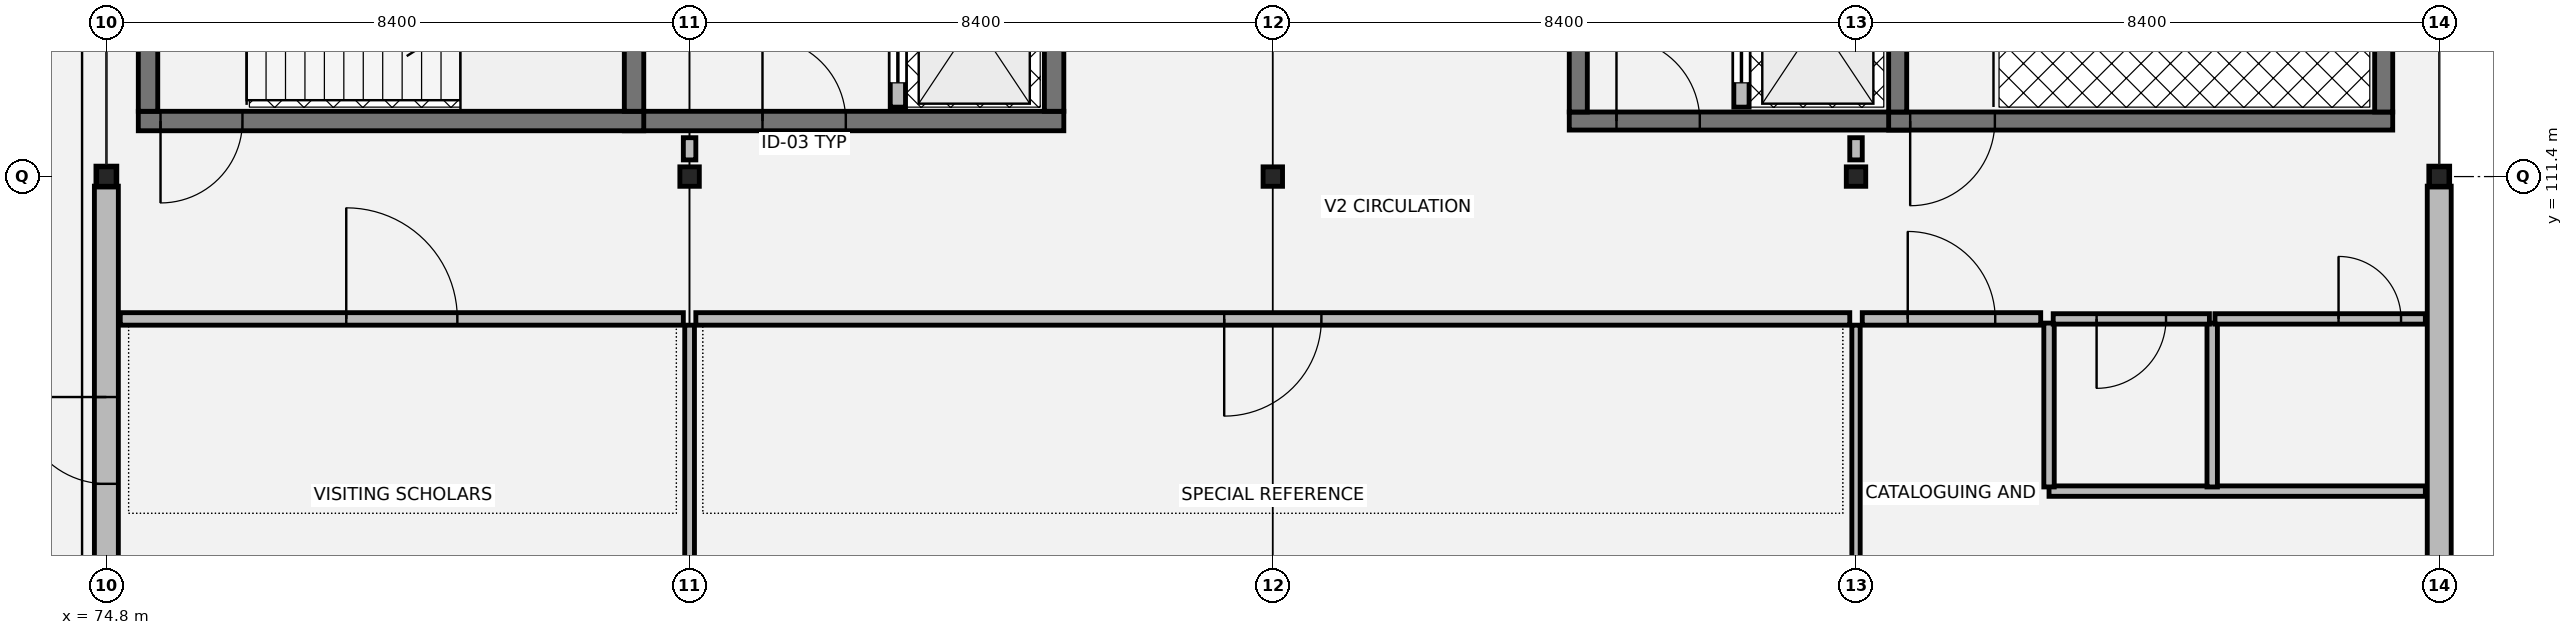
"""IFC4 building model, lengths in metres.
Left out: names, types, materials, properties, quantities, classifications, styles, units other than length and angle.
Written with IfcOpenShell. Run it as: python <this file> out.ifc"""

import sys

from ifc_helpers import new_model, si_unit, direction, frame, frame_2d, origin, origin_2d, place, context, subcontext, project, spatial, rectangle, i_section, extrude, element, fill, save


model = new_model("IFC4")
c1 = context("Model", 3, precision=1e-05, world=origin(), true_north=direction((0.0, 1.0)))
c2 = subcontext(c1, "Body", "Model", "MODEL_VIEW")
j1 = project(units=[si_unit("LENGTHUNIT", "METRE"), si_unit("PLANEANGLEUNIT", "RADIAN")], contexts=[c1])
p1 = place(None, origin())
s1 = spatial("IfcSite", under=j1, at=p1, CompositionType="ELEMENT")
p2 = place(p1, origin())
s2 = spatial("IfcBuilding", under=s1, at=p2, CompositionType="ELEMENT")
p3 = place(p2, frame((0.0, 0.0, 21.42)))
s3 = spatial("IfcBuildingStorey", under=s2, at=p3, CompositionType="ELEMENT", Elevation=21.42)
for number, where, z_axis, x_axis in (
    (1, (74.8, 111.4, 0.0), (0.0, 0.0, 1.0), (1.0, 0.0, 0.0)),
    (2, (83.2, 111.4, 0.0), (0.0, 0.0, 1.0), (1.0, 0.0, 0.0)),
    (3, (91.6, 111.4, 0.0), (0.0, 0.0, 1.0), (1.0, 0.0, 0.0)),
    (4, (100.0, 111.4, 0.0), (0.0, 0.0, 1.0), (1.0, 0.0, 0.0)),
    (5, (108.4, 111.4, 0.0), (0.0, 0.0, 1.0), (1.0, 0.0, 0.0)),
):
    element("IfcColumn", number, at=place(p3, frame(where, z_axis=z_axis, x_axis=x_axis)), inside=s3, PredefinedType="COLUMN", context=c2, shape_type="SweptSolid", body=[
        extrude(i_section(OverallWidth=0.28, OverallDepth=0.28, WebThickness=0.01, FlangeThickness=0.018, at=origin_2d()), origin(), (0.0, 0.0, 1.0), 3.88),
    ])
p4 = place(p3, frame((108.4, 103.938, 0.0), z_axis=(0.0, 0.0, 1.0), x_axis=(0.0, 1.0, 0.0)))
e6 = element("IfcWall", 6, at=p4, inside=s3, PredefinedType="SOLIDWALL", context=c2, shape_type="SweptSolid", body=[
    extrude(rectangle(XDim=7.324, YDim=0.345, at=frame_2d((3.662, 0.0))), origin(), (0.0, 0.0, 1.0), 3.22),
])
p5 = place(p3, frame((74.8, 111.262, 0.0), z_axis=(0.0, 0.0, 1.0), x_axis=(0.0, -1.0, 0.0)))
e7 = element("IfcWall", 7, at=p5, inside=s3, PredefinedType="SOLIDWALL", context=c2, shape_type="SweptSolid", body=[
    extrude(rectangle(XDim=7.324, YDim=0.345, at=frame_2d((3.662, 0.0))), origin(), (0.0, 0.0, 1.0), 3.22),
])
p6 = place(p5, frame((3.037, 0.0, 0.0)))
e8 = element("IfcOpeningElement", 8, at=p6, cuts=e7, PredefinedType="OPENING", context=c2, shape_type="SweptSolid", body=[
    extrude(rectangle(XDim=1.25, YDim=2.2, at=frame_2d((0.625, 1.1))), frame((0.0, 0.182, 0.0), z_axis=(0.0, -1.0, 0.0), x_axis=(1.0, 0.0, 0.0)), (0.0, 0.0, 1.0), 0.365),
])
p7 = place(p3, frame((82.26, 112.2, 0.0), z_axis=(0.0, 0.0, 1.0), x_axis=(1.0, 0.0, 0.0)))
e9 = element("IfcWall", 9, at=p7, inside=s3, PredefinedType="SHEAR", context=c2, shape_type="SweptSolid", body=[
    extrude(rectangle(XDim=6.33, YDim=0.28, at=frame_2d((3.165, 0.0))), origin(), (0.0, 0.0, 1.0), 3.845),
])
p8 = place(p7, frame((1.99, 0.0, 0.0)))
e10 = element("IfcOpeningElement", 10, at=p8, cuts=e9, PredefinedType="OPENING", context=c2, shape_type="SweptSolid", body=[
    extrude(rectangle(XDim=1.2, YDim=2.16, at=frame_2d((0.6, 1.08))), frame((0.0, 0.15, 0.0), z_axis=(0.0, -1.0, 0.0), x_axis=(1.0, 0.0, 0.0)), (0.0, 0.0, 1.0), 0.3),
])
p9 = place(p3, frame((88.45, 112.34, 0.0), z_axis=(0.0, 0.0, 1.0), x_axis=(0.0, 1.0, 0.0)))
e11 = element("IfcWall", 11, at=p9, inside=s3, PredefinedType="SHEAR", context=c2, shape_type="SweptSolid", body=[
    extrude(rectangle(XDim=5.72, YDim=0.28, at=frame_2d((2.86, 0.0))), origin(), (0.0, 0.0, 1.0), 3.845),
])
p10 = place(p3, frame((86.2, 112.4, 0.0), z_axis=(0.0, 0.0, 1.0), x_axis=(0.0, 1.0, 0.0)))
e12 = element("IfcWall", 12, at=p10, inside=s3, PredefinedType="SOLIDWALL", context=c2, shape_type="SweptSolid", body=[
    extrude(rectangle(XDim=5.6, YDim=0.22, at=frame_2d((2.8, 0.0))), origin(), (0.0, 0.0, 1.0), 3.845),
])
p11 = place(p10, frame((0.35, 0.0, 0.0)))
e13 = element("IfcOpeningElement", 13, at=p11, cuts=e12, PredefinedType="OPENING", context=c2, shape_type="SweptSolid", body=[
    extrude(rectangle(XDim=1.1, YDim=2.15, at=frame_2d((0.55, 1.075))), frame((0.0, 0.12, 0.0), z_axis=(0.0, -1.0, 0.0), x_axis=(1.0, 0.0, 0.0)), (0.0, 0.0, 1.0), 0.24),
])
p12 = place(p10, frame((2.4, 0.0, 0.0)))
e14 = element("IfcOpeningElement", 14, at=p12, cuts=e12, PredefinedType="OPENING", context=c2, shape_type="SweptSolid", body=[
    extrude(rectangle(XDim=1.1, YDim=2.15, at=frame_2d((0.55, 1.075))), frame((0.0, 0.12, 0.0), z_axis=(0.0, -1.0, 0.0), x_axis=(1.0, 0.0, 0.0)), (0.0, 0.0, 1.0), 0.24),
])
p13 = place(p3, frame((75.26, 112.2, 0.0), z_axis=(0.0, 0.0, 1.0), x_axis=(1.0, 0.0, 0.0)))
e15 = element("IfcWall", 15, at=p13, inside=s3, PredefinedType="SHEAR", context=c2, shape_type="SweptSolid", body=[
    extrude(rectangle(XDim=7.28, YDim=0.28, at=frame_2d((3.64, 0.0))), origin(), (0.0, 0.0, 1.0), 3.845),
])
p14 = place(p13, frame((0.32, 0.0, 0.0)))
e16 = element("IfcOpeningElement", 16, at=p14, cuts=e15, PredefinedType="OPENING", context=c2, shape_type="SweptSolid", body=[
    extrude(rectangle(XDim=1.18, YDim=2.18, at=frame_2d((0.59, 1.09))), frame((0.0, 0.15, 0.0), z_axis=(0.0, -1.0, 0.0), x_axis=(1.0, 0.0, 0.0)), (0.0, 0.0, 1.0), 0.3),
])
for number, where, z_axis, x_axis in (
    (17, (75.4, 112.34, 0.0), (0.0, 0.0, 1.0), (0.0, 1.0, 0.0)),
    (18, (82.4, 112.34, 0.0), (0.0, 0.0, 1.0), (0.0, 1.0, 0.0)),
):
    element("IfcWall", number, at=place(p3, frame(where, z_axis=z_axis, x_axis=x_axis)), inside=s3, PredefinedType="SHEAR", context=c2, shape_type="SweptSolid", body=[
        extrude(rectangle(XDim=5.72, YDim=0.28, at=frame_2d((2.86, 0.0))), origin(), (0.0, 0.0, 1.0), 3.845),
    ])
p15 = place(p3, frame((95.87, 112.2, 0.0), z_axis=(0.0, 0.0, 1.0), x_axis=(1.0, 0.0, 0.0)))
e19 = element("IfcWall", 19, at=p15, inside=s3, PredefinedType="SHEAR", context=c2, shape_type="SweptSolid", body=[
    extrude(rectangle(XDim=4.86, YDim=0.26, at=frame_2d((2.43, 0.0))), origin(), (0.0, 0.0, 1.0), 3.845),
])
p16 = place(p15, frame((0.68, 0.0, 0.0)))
e20 = element("IfcOpeningElement", 20, at=p16, cuts=e19, PredefinedType="OPENING", context=c2, shape_type="SweptSolid", body=[
    extrude(rectangle(XDim=1.2, YDim=2.16, at=frame_2d((0.6, 1.08))), frame((0.0, 0.14, 0.0), z_axis=(0.0, -1.0, 0.0), x_axis=(1.0, 0.0, 0.0)), (0.0, 0.0, 1.0), 0.28),
])
p17 = place(p3, frame((96.0, 118.07, 0.0), z_axis=(0.0, 0.0, 1.0), x_axis=(0.0, -1.0, 0.0)))
e21 = element("IfcWall", 21, at=p17, inside=s3, PredefinedType="SHEAR", context=c2, shape_type="SweptSolid", body=[
    extrude(rectangle(XDim=5.74, YDim=0.26, at=frame_2d((2.87, 0.0))), origin(), (0.0, 0.0, 1.0), 3.845),
])
p18 = place(p3, frame((98.35, 112.4, 0.0), z_axis=(0.0, 0.0, 1.0), x_axis=(0.0, 1.0, 0.0)))
e22 = element("IfcWall", 22, at=p18, inside=s3, PredefinedType="SOLIDWALL", context=c2, shape_type="SweptSolid", body=[
    extrude(rectangle(XDim=5.6, YDim=0.22, at=frame_2d((2.8, 0.0))), origin(), (0.0, 0.0, 1.0), 3.845),
])
p19 = place(p18, frame((0.35, 0.0, 0.0)))
e23 = element("IfcOpeningElement", 23, at=p19, cuts=e22, PredefinedType="OPENING", context=c2, shape_type="SweptSolid", body=[
    extrude(rectangle(XDim=1.1, YDim=2.15, at=frame_2d((0.55, 1.075))), frame((0.0, 0.12, 0.0), z_axis=(0.0, -1.0, 0.0), x_axis=(1.0, 0.0, 0.0)), (0.0, 0.0, 1.0), 0.24),
])
p20 = place(p3, frame((100.47, 112.2, 0.0), z_axis=(0.0, 0.0, 1.0), x_axis=(1.0, 0.0, 0.0)))
e24 = element("IfcWall", 24, at=p20, inside=s3, PredefinedType="SHEAR", context=c2, shape_type="SweptSolid", body=[
    extrude(rectangle(XDim=7.26, YDim=0.26, at=frame_2d((3.63, 0.0))), origin(), (0.0, 0.0, 1.0), 3.845),
])
p21 = place(p20, frame((0.31, 0.0, 0.0)))
e25 = element("IfcOpeningElement", 25, at=p21, cuts=e24, PredefinedType="OPENING", context=c2, shape_type="SweptSolid", body=[
    extrude(rectangle(XDim=1.22, YDim=2.18, at=frame_2d((0.61, 1.09))), frame((0.0, 0.14, 0.0), z_axis=(0.0, -1.0, 0.0), x_axis=(1.0, 0.0, 0.0)), (0.0, 0.0, 1.0), 0.28),
])
for number, where, z_axis, x_axis in (
    (26, (100.6, 112.33, 0.0), (0.0, 0.0, 1.0), (0.0, 1.0, 0.0)),
    (27, (107.6, 112.33, 0.0), (0.0, 0.0, 1.0), (0.0, 1.0, 0.0)),
):
    element("IfcWall", number, at=place(p3, frame(where, z_axis=z_axis, x_axis=x_axis)), inside=s3, PredefinedType="SHEAR", context=c2, shape_type="SweptSolid", body=[
        extrude(rectangle(XDim=5.74, YDim=0.26, at=frame_2d((2.87, 0.0))), origin(), (0.0, 0.0, 1.0), 3.845),
    ])
p22 = place(p3, frame((102.78, 106.87, 0.0), z_axis=(0.0, 0.0, 1.0), x_axis=(1.0, 0.0, 0.0)))
e28 = element("IfcWall", 28, at=p22, inside=s3, PredefinedType="PARTITIONING", context=c2, shape_type="SweptSolid", body=[
    extrude(rectangle(XDim=5.42, YDim=0.15, at=frame_2d((2.71, 0.0))), origin(), (0.0, 0.0, 1.0), 3.18),
])
for number, where, z_axis, x_axis in (
    (29, (102.78, 106.93, 0.0), (0.0, 0.0, 1.0), (0.0, 1.0, 0.0)),
    (30, (105.13, 106.93, 0.0), (0.0, 0.0, 1.0), (0.0, 1.0, 0.0)),
):
    element("IfcWall", number, at=place(p3, frame(where, z_axis=z_axis, x_axis=x_axis)), inside=s3, PredefinedType="PARTITIONING", context=c2, shape_type="SweptSolid", body=[
        extrude(rectangle(XDim=2.36, YDim=0.15, at=frame_2d((1.18, 0.0))), origin(), (0.0, 0.0, 1.0), 3.18),
    ])
p23 = place(p3, frame((102.84, 109.35, 0.0), z_axis=(0.0, 0.0, 1.0), x_axis=(1.0, 0.0, 0.0)))
e31 = element("IfcWall", 31, at=p23, inside=s3, PredefinedType="PARTITIONING", context=c2, shape_type="SweptSolid", body=[
    extrude(rectangle(XDim=2.25, YDim=0.15, at=frame_2d((1.125, 0.0))), origin(), (0.0, 0.0, 1.0), 3.18),
])
p24 = place(p23, frame((0.625, 0.0, 0.0)))
e32 = element("IfcOpeningElement", 32, at=p24, cuts=e31, PredefinedType="OPENING", context=c2, shape_type="SweptSolid", body=[
    extrude(rectangle(XDim=1.0, YDim=2.15, at=frame_2d((0.5, 1.075))), frame((0.0, 0.085, 0.0), z_axis=(0.0, -1.0, 0.0), x_axis=(1.0, 0.0, 0.0)), (0.0, 0.0, 1.0), 0.17),
])
p25 = place(p3, frame((105.17, 109.35, 0.0), z_axis=(0.0, 0.0, 1.0), x_axis=(1.0, 0.0, 0.0)))
e33 = element("IfcWall", 33, at=p25, inside=s3, PredefinedType="PARTITIONING", context=c2, shape_type="SweptSolid", body=[
    extrude(rectangle(XDim=3.03, YDim=0.15, at=frame_2d((1.515, 0.0))), origin(), (0.0, 0.0, 1.0), 3.18),
])
p26 = place(p25, frame((1.78, 0.0, 0.0)))
e34 = element("IfcOpeningElement", 34, at=p26, cuts=e33, PredefinedType="OPENING", context=c2, shape_type="SweptSolid", body=[
    extrude(rectangle(XDim=0.9, YDim=2.15, at=frame_2d((0.45, 1.075))), frame((0.0, 0.085, 0.0), z_axis=(0.0, -1.0, 0.0), x_axis=(1.0, 0.0, 0.0)), (0.0, 0.0, 1.0), 0.17),
])
p27 = place(p3, frame((75.0, 109.35, 0.0), z_axis=(0.0, 0.0, 1.0), x_axis=(1.0, 0.0, 0.0)))
e35 = element("IfcWall", 35, at=p27, inside=s3, PredefinedType="PARTITIONING", context=c2, shape_type="SweptSolid", body=[
    extrude(rectangle(XDim=8.11, YDim=0.18, at=frame_2d((4.055, 0.0))), origin(), (0.0, 0.0, 1.0), 3.18),
])
p28 = place(p27, frame((3.255, 0.0, 0.0)))
e36 = element("IfcOpeningElement", 36, at=p28, cuts=e35, PredefinedType="OPENING", context=c2, shape_type="SweptSolid", body=[
    extrude(rectangle(XDim=1.6, YDim=2.25, at=frame_2d((0.8, 1.125))), frame((0.0, 0.1, 0.0), z_axis=(0.0, -1.0, 0.0), x_axis=(1.0, 0.0, 0.0)), (0.0, 0.0, 1.0), 0.2),
])
p29 = place(p3, frame((83.29, 109.35, 0.0), z_axis=(0.0, 0.0, 1.0), x_axis=(1.0, 0.0, 0.0)))
e37 = element("IfcWall", 37, at=p29, inside=s3, PredefinedType="PARTITIONING", context=c2, shape_type="SweptSolid", body=[
    extrude(rectangle(XDim=16.62, YDim=0.18, at=frame_2d((8.31, 0.0))), origin(), (0.0, 0.0, 1.0), 3.18),
])
p30 = place(p29, frame((7.61, 0.0, 0.0)))
e38 = element("IfcOpeningElement", 38, at=p30, cuts=e37, PredefinedType="OPENING", context=c2, shape_type="SweptSolid", body=[
    extrude(rectangle(XDim=1.4, YDim=2.22, at=frame_2d((0.7, 1.11))), frame((0.0, 0.1, 0.0), z_axis=(0.0, -1.0, 0.0), x_axis=(1.0, 0.0, 0.0)), (0.0, 0.0, 1.0), 0.2),
])
p31 = place(p3, frame((100.09, 109.35, 0.0), z_axis=(0.0, 0.0, 1.0), x_axis=(1.0, 0.0, 0.0)))
e39 = element("IfcWall", 39, at=p31, inside=s3, PredefinedType="PARTITIONING", context=c2, shape_type="SweptSolid", body=[
    extrude(rectangle(XDim=2.57, YDim=0.18, at=frame_2d((1.285, 0.0))), origin(), (0.0, 0.0, 1.0), 3.18),
])
p32 = place(p31, frame((0.655, 0.0, 0.0)))
e40 = element("IfcOpeningElement", 40, at=p32, cuts=e39, PredefinedType="OPENING", context=c2, shape_type="SweptSolid", body=[
    extrude(rectangle(XDim=1.26, YDim=2.2, at=frame_2d((0.63, 1.1))), frame((0.0, 0.1, 0.0), z_axis=(0.0, -1.0, 0.0), x_axis=(1.0, 0.0, 0.0)), (0.0, 0.0, 1.0), 0.2),
])
for number, where, z_axis, x_axis in (
    (41, (83.2, 111.64, 0.0), (0.0, 0.0, 1.0), (0.0, 1.0, 0.0)),
    (42, (100.0, 111.64, 0.0), (0.0, 0.0, 1.0), (0.0, 1.0, 0.0)),
):
    element("IfcWall", number, at=place(p3, frame(where, z_axis=z_axis, x_axis=x_axis)), inside=s3, PredefinedType="PARTITIONING", context=c2, shape_type="SweptSolid", body=[
        extrude(rectangle(XDim=0.32, YDim=0.18, at=frame_2d((0.16, 0.0))), origin(), (0.0, 0.0, 1.0), 3.18),
    ])
p33 = place(p3, frame((83.2, 104.12, 0.0), z_axis=(0.0, 0.0, 1.0), x_axis=(0.0, 1.0, 0.0)))
e43 = element("IfcWall", 43, at=p33, inside=s3, PredefinedType="PARTITIONING", context=c2, shape_type="SweptSolid", body=[
    extrude(rectangle(XDim=5.14, YDim=0.14, at=frame_2d((2.57, 0.0))), origin(), (0.0, 0.0, 1.0), 3.18),
])
p34 = place(p3, frame((100.0, 104.12, 0.0), z_axis=(0.0, 0.0, 1.0), x_axis=(0.0, 1.0, 0.0)))
e44 = element("IfcWall", 44, at=p34, inside=s3, PredefinedType="PARTITIONING", context=c2, shape_type="SweptSolid", body=[
    extrude(rectangle(XDim=5.14, YDim=0.12, at=frame_2d((2.57, 0.0))), origin(), (0.0, 0.0, 1.0), 3.18),
])
p35 = place(p6, origin())
e45 = element("IfcDoor", 45, at=p35, inside=s3, OperationType="SINGLE_SWING_RIGHT", PredefinedType="DOOR", context=c2, shape_type="SweptSolid", body=[
    extrude(rectangle(XDim=1.25, YDim=2.2, at=frame_2d((0.625, 1.1))), frame((0.0, 0.025, 0.0), z_axis=(0.0, -1.0, 0.0), x_axis=(1.0, 0.0, 0.0)), (0.0, 0.0, 1.0), 0.05),
])
fill(e8, e45)
p36 = place(p8, origin())
e46 = element("IfcDoor", 46, at=p36, inside=s3, OperationType="SINGLE_SWING_LEFT", PredefinedType="DOOR", context=c2, shape_type="SweptSolid", body=[
    extrude(rectangle(XDim=1.2, YDim=2.16, at=frame_2d((0.6, 1.08))), frame((0.0, 0.025, 0.0), z_axis=(0.0, -1.0, 0.0), x_axis=(1.0, 0.0, 0.0)), (0.0, 0.0, 1.0), 0.05),
])
fill(e10, e46)
p37 = place(p11, origin())
e47 = element("IfcDoor", 47, at=p37, inside=s3, OperationType="SLIDING_TO_LEFT", PredefinedType="DOOR", context=c2, shape_type="SweptSolid", body=[
    extrude(rectangle(XDim=1.1, YDim=2.15, at=frame_2d((0.55, 1.075))), frame((0.0, 0.025, 0.0), z_axis=(0.0, -1.0, 0.0), x_axis=(1.0, 0.0, 0.0)), (0.0, 0.0, 1.0), 0.05),
])
fill(e13, e47)
p38 = place(p14, origin())
e48 = element("IfcDoor", 48, at=p38, inside=s3, OperationType="SINGLE_SWING_RIGHT", PredefinedType="DOOR", context=c2, shape_type="SweptSolid", body=[
    extrude(rectangle(XDim=1.18, YDim=2.18, at=frame_2d((0.59, 1.09))), frame((0.0, 0.025, 0.0), z_axis=(0.0, -1.0, 0.0), x_axis=(1.0, 0.0, 0.0)), (0.0, 0.0, 1.0), 0.05),
])
fill(e16, e48)
p39 = place(p16, origin())
e49 = element("IfcDoor", 49, at=p39, inside=s3, OperationType="SINGLE_SWING_LEFT", PredefinedType="DOOR", context=c2, shape_type="SweptSolid", body=[
    extrude(rectangle(XDim=1.2, YDim=2.16, at=frame_2d((0.6, 1.08))), frame((0.0, 0.025, 0.0), z_axis=(0.0, -1.0, 0.0), x_axis=(1.0, 0.0, 0.0)), (0.0, 0.0, 1.0), 0.05),
])
fill(e20, e49)
p40 = place(p19, origin())
e50 = element("IfcDoor", 50, at=p40, inside=s3, OperationType="SLIDING_TO_LEFT", PredefinedType="DOOR", context=c2, shape_type="SweptSolid", body=[
    extrude(rectangle(XDim=1.1, YDim=2.15, at=frame_2d((0.55, 1.075))), frame((0.0, 0.025, 0.0), z_axis=(0.0, -1.0, 0.0), x_axis=(1.0, 0.0, 0.0)), (0.0, 0.0, 1.0), 0.05),
])
fill(e23, e50)
p41 = place(p21, origin())
e51 = element("IfcDoor", 51, at=p41, inside=s3, OperationType="SINGLE_SWING_RIGHT", PredefinedType="DOOR", context=c2, shape_type="SweptSolid", body=[
    extrude(rectangle(XDim=1.22, YDim=2.18, at=frame_2d((0.61, 1.09))), frame((0.0, 0.025, 0.0), z_axis=(0.0, -1.0, 0.0), x_axis=(1.0, 0.0, 0.0)), (0.0, 0.0, 1.0), 0.05),
])
fill(e25, e51)
p42 = place(p24, origin())
e52 = element("IfcDoor", 52, at=p42, inside=s3, OperationType="SINGLE_SWING_RIGHT", PredefinedType="DOOR", context=c2, shape_type="SweptSolid", body=[
    extrude(rectangle(XDim=1.0, YDim=2.15, at=frame_2d((0.5, 1.075))), frame((0.0, 0.025, 0.0), z_axis=(0.0, -1.0, 0.0), x_axis=(1.0, 0.0, 0.0)), (0.0, 0.0, 1.0), 0.05),
])
fill(e32, e52)
p43 = place(p26, origin())
e53 = element("IfcDoor", 53, at=p43, inside=s3, OperationType="SINGLE_SWING_LEFT", PredefinedType="DOOR", context=c2, shape_type="SweptSolid", body=[
    extrude(rectangle(XDim=0.9, YDim=2.15, at=frame_2d((0.45, 1.075))), frame((0.0, 0.025, 0.0), z_axis=(0.0, -1.0, 0.0), x_axis=(1.0, 0.0, 0.0)), (0.0, 0.0, 1.0), 0.05),
])
fill(e34, e53)
p44 = place(p28, origin())
e54 = element("IfcDoor", 54, at=p44, inside=s3, OperationType="DOUBLE_DOOR_SINGLE_SWING", PredefinedType="DOOR", context=c2, shape_type="SweptSolid", body=[
    extrude(rectangle(XDim=1.6, YDim=2.25, at=frame_2d((0.8, 1.125))), frame((0.0, 0.025, 0.0), z_axis=(0.0, -1.0, 0.0), x_axis=(1.0, 0.0, 0.0)), (0.0, 0.0, 1.0), 0.05),
])
fill(e36, e54)
p45 = place(p30, origin())
e55 = element("IfcDoor", 55, at=p45, inside=s3, OperationType="SINGLE_SWING_RIGHT", PredefinedType="DOOR", context=c2, shape_type="SweptSolid", body=[
    extrude(rectangle(XDim=1.4, YDim=2.22, at=frame_2d((0.7, 1.11))), frame((0.0, 0.025, 0.0), z_axis=(0.0, -1.0, 0.0), x_axis=(1.0, 0.0, 0.0)), (0.0, 0.0, 1.0), 0.05),
])
fill(e38, e55)
p46 = place(p32, origin())
e56 = element("IfcDoor", 56, at=p46, inside=s3, OperationType="SINGLE_SWING_LEFT", PredefinedType="DOOR", context=c2, shape_type="SweptSolid", body=[
    extrude(rectangle(XDim=1.26, YDim=2.2, at=frame_2d((0.63, 1.1))), frame((0.0, 0.025, 0.0), z_axis=(0.0, -1.0, 0.0), x_axis=(1.0, 0.0, 0.0)), (0.0, 0.0, 1.0), 0.05),
])
fill(e40, e56)
save(model, sys.argv[1])
